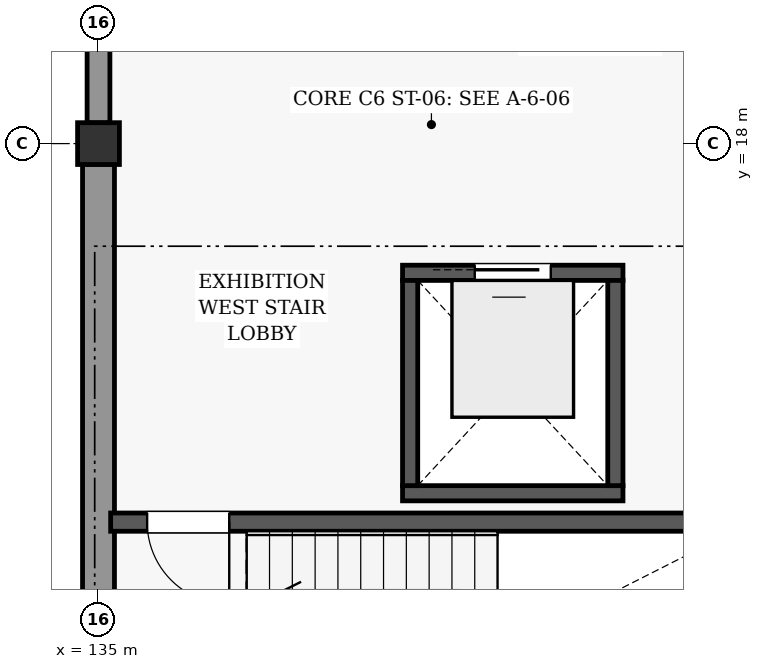
"""IFC4 building model, lengths in metres.
Left out: names, types, materials, properties, quantities, classifications, styles, units other than length and angle.
Written with IfcOpenShell. Run it as: python <this file> out.ifc"""

import sys

from ifc_helpers import new_model, si_unit, direction, frame, frame_2d, origin, origin_2d, place, context, subcontext, project, spatial, rectangle, extrude, element, fill, save


model = new_model("IFC4")
c1 = context("Model", 3, precision=1e-05, world=origin(), true_north=direction((0.0, 1.0)))
c2 = subcontext(c1, "Body", "Model", "MODEL_VIEW")
j1 = project(units=[si_unit("LENGTHUNIT", "METRE"), si_unit("PLANEANGLEUNIT", "RADIAN")], contexts=[c1])
p1 = place(None, origin())
s1 = spatial("IfcSite", under=j1, at=p1, CompositionType="ELEMENT")
p2 = place(p1, origin())
s2 = spatial("IfcBuilding", under=s1, at=p2, CompositionType="ELEMENT")
p3 = place(p2, frame((0.0, 0.0, 4.8)))
s3 = spatial("IfcBuildingStorey", under=s2, at=p3, CompositionType="ELEMENT", Elevation=4.8)
p4 = place(p3, frame((135.0, 18.0, 0.0), z_axis=(0.0, 0.0, 1.0), x_axis=(1.0, 0.0, 0.0)))
e1 = element("IfcColumn", 1, at=p4, inside=s3, PredefinedType="COLUMN", context=c2, shape_type="SweptSolid", body=[
    extrude(rectangle(XDim=0.55, YDim=0.55, at=origin_2d()), origin(), (0.0, 0.0, 1.0), 3.6),
])
p5 = place(p3, frame((135.0, 9.273, 0.0), z_axis=(0.0, 0.0, 1.0), x_axis=(0.0, 1.0, 0.0)))
e2 = element("IfcWall", 2, at=p5, inside=s3, PredefinedType="SOLIDWALL", context=c2, shape_type="SweptSolid", body=[
    extrude(rectangle(XDim=8.454, YDim=0.42, at=frame_2d((4.227, 0.0))), origin(), (0.0, 0.0, 1.0), 2.862),
])
p6 = place(p3, frame((135.0, 18.273, 0.0), z_axis=(0.0, 0.0, 1.0), x_axis=(0.0, 1.0, 0.0)))
e3 = element("IfcWall", 3, at=p6, inside=s3, PredefinedType="SOLIDWALL", context=c2, shape_type="SweptSolid", body=[
    extrude(rectangle(XDim=8.454, YDim=0.3, at=frame_2d((4.227, 0.0))), origin(), (0.0, 0.0, 1.0), 2.862),
])
p7 = place(p6, frame((1.831, 0.0, 0.85)))
e4 = element("IfcOpeningElement", 4, at=p7, cuts=e3, PredefinedType="OPENING", context=c2, shape_type="SweptSolid", body=[
    extrude(rectangle(XDim=1.48, YDim=1.56, at=frame_2d((0.74, 0.78))), frame((0.0, 0.16, 0.0), z_axis=(0.0, -1.0, 0.0), x_axis=(1.0, 0.0, 0.0)), (0.0, 0.0, 1.0), 0.32),
])
p8 = place(p6, frame((5.143, 0.0, 0.85)))
e5 = element("IfcOpeningElement", 5, at=p8, cuts=e3, PredefinedType="OPENING", context=c2, shape_type="SweptSolid", body=[
    extrude(rectangle(XDim=1.48, YDim=1.56, at=frame_2d((0.74, 0.78))), frame((0.0, 0.16, 0.0), z_axis=(0.0, -1.0, 0.0), x_axis=(1.0, 0.0, 0.0)), (0.0, 0.0, 1.0), 0.32),
])
p9 = place(p3, frame((135.16, 13.02, 0.0), z_axis=(0.0, 0.0, 1.0), x_axis=(1.0, 0.0, 0.0)))
e6 = element("IfcWall", 6, at=p9, inside=s3, PredefinedType="SHEAR", context=c2, shape_type="SweptSolid", body=[
    extrude(rectangle(XDim=8.44, YDim=0.24, at=frame_2d((4.22, 0.0))), origin(), (0.0, 0.0, 1.0), 3.35),
])
p10 = place(p9, frame((0.48, 0.0, 0.0)))
e7 = element("IfcOpeningElement", 7, at=p10, cuts=e6, PredefinedType="OPENING", context=c2, shape_type="SweptSolid", body=[
    extrude(rectangle(XDim=1.08, YDim=2.08, at=frame_2d((0.54, 1.04))), frame((0.0, 0.13, 0.0), z_axis=(0.0, -1.0, 0.0), x_axis=(1.0, 0.0, 0.0)), (0.0, 0.0, 1.0), 0.26),
])
p11 = place(p3, frame((139.0, 13.4, 0.0), z_axis=(0.0, 0.0, 1.0), x_axis=(1.0, 0.0, 0.0)))
e8 = element("IfcWall", 8, at=p11, inside=s3, PredefinedType="SHEAR", context=c2, shape_type="SweptSolid", body=[
    extrude(rectangle(XDim=2.9, YDim=0.2, at=frame_2d((1.45, 0.0))), origin(), (0.0, 0.0, 1.0), 3.35),
])
p12 = place(p3, frame((139.0, 16.3, 0.0), z_axis=(0.0, 0.0, 1.0), x_axis=(1.0, 0.0, 0.0)))
e9 = element("IfcWall", 9, at=p12, inside=s3, PredefinedType="SHEAR", context=c2, shape_type="SweptSolid", body=[
    extrude(rectangle(XDim=2.9, YDim=0.2, at=frame_2d((1.45, 0.0))), origin(), (0.0, 0.0, 1.0), 3.35),
])
p13 = place(p12, frame((0.95, 0.0, 0.0)))
e10 = element("IfcOpeningElement", 10, at=p13, cuts=e9, PredefinedType="OPENING", context=c2, shape_type="SweptSolid", body=[
    extrude(rectangle(XDim=1.0, YDim=2.1, at=frame_2d((0.5, 1.05))), frame((0.0, 0.11, 0.0), z_axis=(0.0, -1.0, 0.0), x_axis=(1.0, 0.0, 0.0)), (0.0, 0.0, 1.0), 0.22),
])
for number, where, z_axis, x_axis in (
    (11, (139.1, 13.5, 0.0), (0.0, 0.0, 1.0), (0.0, 1.0, 0.0)),
    (12, (141.8, 13.5, 0.0), (0.0, 0.0, 1.0), (0.0, 1.0, 0.0)),
):
    element("IfcWall", number, at=place(p3, frame(where, z_axis=z_axis, x_axis=x_axis)), inside=s3, PredefinedType="SHEAR", context=c2, shape_type="SweptSolid", body=[
        extrude(rectangle(XDim=2.7, YDim=0.2, at=frame_2d((1.35, 0.0))), origin(), (0.0, 0.0, 1.0), 3.35),
    ])
p14 = place(p10, frame((1.08, 0.0, 0.0), z_axis=(0.0, 0.0, 1.0), x_axis=(-1.0, 0.0, 0.0)))
e13 = element("IfcDoor", 13, at=p14, inside=s3, OperationType="SINGLE_SWING_RIGHT", PredefinedType="DOOR", context=c2, shape_type="SweptSolid", body=[
    extrude(rectangle(XDim=1.08, YDim=2.08, at=frame_2d((0.54, 1.04))), frame((0.0, 0.025, 0.0), z_axis=(0.0, -1.0, 0.0), x_axis=(1.0, 0.0, 0.0)), (0.0, 0.0, 1.0), 0.05),
])
fill(e7, e13)
p15 = place(p13, origin())
e14 = element("IfcDoor", 14, at=p15, inside=s3, OperationType="SLIDING_TO_LEFT", PredefinedType="DOOR", context=c2, shape_type="SweptSolid", body=[
    extrude(rectangle(XDim=1.0, YDim=2.1, at=frame_2d((0.5, 1.05))), frame((0.0, 0.025, 0.0), z_axis=(0.0, -1.0, 0.0), x_axis=(1.0, 0.0, 0.0)), (0.0, 0.0, 1.0), 0.05),
])
fill(e10, e14)
save(model, sys.argv[1])
